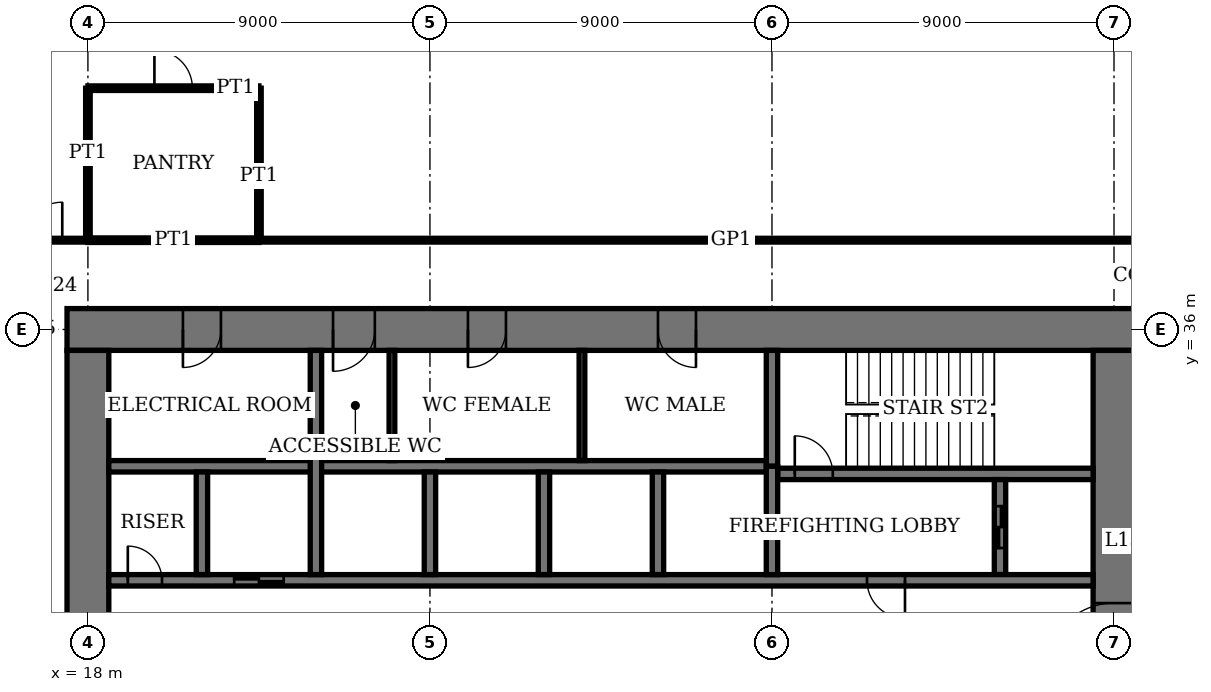
"""IFC4 building model, lengths in metres.
Left out: names, types, materials, properties, quantities, classifications, styles, units other than length and angle.
Written with IfcOpenShell. Run it as: python <this file> out.ifc"""

import sys

from ifc_helpers import new_model, si_unit, direction, frame, frame_2d, origin, place, context, subcontext, project, spatial, rectangle, extrude, element, fill, save


model = new_model("IFC4")
c1 = context("Model", 3, precision=1e-05, world=origin(), true_north=direction((0.0, 1.0)))
c2 = subcontext(c1, "Body", "Model", "MODEL_VIEW")
j1 = project(units=[si_unit("LENGTHUNIT", "METRE"), si_unit("PLANEANGLEUNIT", "RADIAN")], contexts=[c1])
p1 = place(None, origin())
s1 = spatial("IfcSite", under=j1, at=p1, CompositionType="ELEMENT")
p2 = place(p1, origin())
s2 = spatial("IfcBuilding", under=s1, at=p2, CompositionType="ELEMENT")
p3 = place(p2, frame((0.0, 0.0, 55.8)))
s3 = spatial("IfcBuildingStorey", under=s2, at=p3, CompositionType="ELEMENT", Elevation=55.8)
p4 = place(p3, frame((45.55, 36.0, 0.0), z_axis=(0.0, 0.0, 1.0), x_axis=(-1.0, 0.0, 0.0)))
e1 = element("IfcWall", 1, at=p4, inside=s3, PredefinedType="SHEAR", context=c2, shape_type="SweptSolid", body=[
    extrude(rectangle(XDim=28.1, YDim=1.1, at=frame_2d((14.05, 0.0))), origin(), (0.0, 0.0, 1.0), 4.0),
])
p5 = place(p4, frame((11.55, 0.0, 0.0)))
e2 = element("IfcOpeningElement", 2, at=p5, cuts=e1, PredefinedType="OPENING", context=c2, shape_type="SweptSolid", body=[
    extrude(rectangle(XDim=1.0, YDim=2.4, at=frame_2d((0.5, 1.2))), frame((0.0, 0.56, 0.0), z_axis=(0.0, -1.0, 0.0), x_axis=(1.0, 0.0, 0.0)), (0.0, 0.0, 1.0), 1.12),
])
p6 = place(p4, frame((16.55, 0.0, 0.0)))
e3 = element("IfcOpeningElement", 3, at=p6, cuts=e1, PredefinedType="OPENING", context=c2, shape_type="SweptSolid", body=[
    extrude(rectangle(XDim=1.0, YDim=2.4, at=frame_2d((0.5, 1.2))), frame((0.0, 0.56, 0.0), z_axis=(0.0, -1.0, 0.0), x_axis=(1.0, 0.0, 0.0)), (0.0, 0.0, 1.0), 1.12),
])
p7 = place(p4, frame((20.0, 0.0, 0.0)))
e4 = element("IfcOpeningElement", 4, at=p7, cuts=e1, PredefinedType="OPENING", context=c2, shape_type="SweptSolid", body=[
    extrude(rectangle(XDim=1.1, YDim=2.4, at=frame_2d((0.55, 1.2))), frame((0.0, 0.56, 0.0), z_axis=(0.0, -1.0, 0.0), x_axis=(1.0, 0.0, 0.0)), (0.0, 0.0, 1.0), 1.12),
])
p8 = place(p4, frame((24.05, 0.0, 0.0)))
e5 = element("IfcOpeningElement", 5, at=p8, cuts=e1, PredefinedType="OPENING", context=c2, shape_type="SweptSolid", body=[
    extrude(rectangle(XDim=1.0, YDim=2.4, at=frame_2d((0.5, 1.2))), frame((0.0, 0.56, 0.0), z_axis=(0.0, -1.0, 0.0), x_axis=(1.0, 0.0, 0.0)), (0.0, 0.0, 1.0), 1.12),
])
p9 = place(p3, frame((18.0, 35.45, 0.0), z_axis=(0.0, 0.0, 1.0), x_axis=(0.0, -1.0, 0.0)))
e6 = element("IfcWall", 6, at=p9, inside=s3, PredefinedType="SHEAR", context=c2, shape_type="SweptSolid", body=[
    extrude(rectangle(XDim=16.9, YDim=1.1, at=frame_2d((8.45, 0.0))), origin(), (0.0, 0.0, 1.0), 4.0),
])
p10 = place(p9, frame((8.45, 0.0, 0.0)))
e7 = element("IfcOpeningElement", 7, at=p10, cuts=e6, PredefinedType="OPENING", context=c2, shape_type="SweptSolid", body=[
    extrude(rectangle(XDim=1.8, YDim=2.4, at=frame_2d((0.9, 1.2))), frame((0.0, 0.56, 0.0), z_axis=(0.0, -1.0, 0.0), x_axis=(1.0, 0.0, 0.0)), (0.0, 0.0, 1.0), 1.12),
])
p11 = place(p3, frame((45.0, 18.55, 0.0), z_axis=(0.0, 0.0, 1.0), x_axis=(0.0, 1.0, 0.0)))
e8 = element("IfcWall", 8, at=p11, inside=s3, PredefinedType="SHEAR", context=c2, shape_type="SweptSolid", body=[
    extrude(rectangle(XDim=16.9, YDim=1.1, at=frame_2d((8.45, 0.0))), origin(), (0.0, 0.0, 1.0), 4.0),
])
p12 = place(p11, frame((8.45, 0.0, 0.0)))
e9 = element("IfcOpeningElement", 9, at=p12, cuts=e8, PredefinedType="OPENING", context=c2, shape_type="SweptSolid", body=[
    extrude(rectangle(XDim=1.8, YDim=2.4, at=frame_2d((0.9, 1.2))), frame((0.0, 0.56, 0.0), z_axis=(0.0, -1.0, 0.0), x_axis=(1.0, 0.0, 0.0)), (0.0, 0.0, 1.0), 1.12),
])
p13 = place(p3, frame((36.15, 32.2, 0.0), z_axis=(0.0, 0.0, 1.0), x_axis=(1.0, 0.0, 0.0)))
e10 = element("IfcWall", 10, at=p13, inside=s3, PredefinedType="SHEAR", context=c2, shape_type="SweptSolid", body=[
    extrude(rectangle(XDim=8.3, YDim=0.3, at=frame_2d((4.15, 0.0))), origin(), (0.0, 0.0, 1.0), 4.0),
])
p14 = place(p13, frame((0.45, 0.0, 0.0)))
e11 = element("IfcOpeningElement", 11, at=p14, cuts=e10, PredefinedType="OPENING", context=c2, shape_type="SweptSolid", body=[
    extrude(rectangle(XDim=1.0, YDim=2.4, at=frame_2d((0.5, 1.2))), frame((0.0, 0.16, 0.0), z_axis=(0.0, -1.0, 0.0), x_axis=(1.0, 0.0, 0.0)), (0.0, 0.0, 1.0), 0.32),
])
p15 = place(p3, frame((36.0, 32.4, 0.0), z_axis=(0.0, 0.0, 1.0), x_axis=(0.0, 1.0, 0.0)))
e12 = element("IfcWall", 12, at=p15, inside=s3, PredefinedType="SHEAR", context=c2, shape_type="SweptSolid", body=[
    extrude(rectangle(XDim=3.05, YDim=0.3, at=frame_2d((1.525, 0.0))), origin(), (0.0, 0.0, 1.0), 4.0),
])
p16 = place(p3, frame((42.0, 29.55, 0.0), z_axis=(0.0, 0.0, 1.0), x_axis=(0.0, 1.0, 0.0)))
e13 = element("IfcWall", 13, at=p16, inside=s3, PredefinedType="SHEAR", context=c2, shape_type="SweptSolid", body=[
    extrude(rectangle(XDim=2.5, YDim=0.3, at=frame_2d((1.25, 0.0))), origin(), (0.0, 0.0, 1.0), 4.0),
])
p17 = place(p16, frame((0.7, 0.0, 0.0)))
e14 = element("IfcOpeningElement", 14, at=p17, cuts=e13, PredefinedType="OPENING", context=c2, shape_type="SweptSolid", body=[
    extrude(rectangle(XDim=1.1, YDim=2.4, at=frame_2d((0.55, 1.2))), frame((0.0, 0.16, 0.0), z_axis=(0.0, -1.0, 0.0), x_axis=(1.0, 0.0, 0.0)), (0.0, 0.0, 1.0), 0.32),
])
p18 = place(p3, frame((18.55, 29.4, 0.0), z_axis=(0.0, 0.0, 1.0), x_axis=(1.0, 0.0, 0.0)))
e15 = element("IfcWall", 15, at=p18, inside=s3, PredefinedType="SHEAR", context=c2, shape_type="SweptSolid", body=[
    extrude(rectangle(XDim=25.9, YDim=0.3, at=frame_2d((12.95, 0.0))), origin(), (0.0, 0.0, 1.0), 4.0),
])
p19 = place(p18, frame((19.95, 0.0, 0.0)))
e16 = element("IfcOpeningElement", 16, at=p19, cuts=e15, PredefinedType="OPENING", context=c2, shape_type="SweptSolid", body=[
    extrude(rectangle(XDim=1.0, YDim=2.4, at=frame_2d((0.5, 1.2))), frame((0.0, 0.16, 0.0), z_axis=(0.0, -1.0, 0.0), x_axis=(1.0, 0.0, 0.0)), (0.0, 0.0, 1.0), 0.32),
])
p20 = place(p18, frame((0.5, 0.0, 0.0)))
e17 = element("IfcOpeningElement", 17, at=p20, cuts=e15, PredefinedType="OPENING", context=c2, shape_type="SweptSolid", body=[
    extrude(rectangle(XDim=0.9, YDim=2.1, at=frame_2d((0.45, 1.05))), frame((0.0, 0.16, 0.0), z_axis=(0.0, -1.0, 0.0), x_axis=(1.0, 0.0, 0.0)), (0.0, 0.0, 1.0), 0.32),
])
p21 = place(p18, frame((3.3, 0.0, 0.0)))
e18 = element("IfcOpeningElement", 18, at=p21, cuts=e15, PredefinedType="OPENING", context=c2, shape_type="SweptSolid", body=[
    extrude(rectangle(XDim=1.3, YDim=2.4, at=frame_2d((0.65, 1.2))), frame((0.0, 0.16, 0.0), z_axis=(0.0, -1.0, 0.0), x_axis=(1.0, 0.0, 0.0)), (0.0, 0.0, 1.0), 0.32),
])
p22 = place(p3, frame((18.55, 32.4, 0.0), z_axis=(0.0, 0.0, 1.0), x_axis=(1.0, 0.0, 0.0)))
e19 = element("IfcWall", 19, at=p22, inside=s3, PredefinedType="SHEAR", context=c2, shape_type="SweptSolid", body=[
    extrude(rectangle(XDim=17.3, YDim=0.3, at=frame_2d((8.65, 0.0))), origin(), (0.0, 0.0, 1.0), 4.0),
])
for number, where, z_axis, x_axis in (
    (20, (33.0, 29.55, 0.0), (0.0, 0.0, 1.0), (0.0, 1.0, 0.0)),
    (21, (30.0, 29.55, 0.0), (0.0, 0.0, 1.0), (0.0, 1.0, 0.0)),
    (22, (27.0, 29.55, 0.0), (0.0, 0.0, 1.0), (0.0, 1.0, 0.0)),
):
    element("IfcWall", number, at=place(p3, frame(where, z_axis=z_axis, x_axis=x_axis)), inside=s3, PredefinedType="SHEAR", context=c2, shape_type="SweptSolid", body=[
        extrude(rectangle(XDim=2.7, YDim=0.3, at=frame_2d((1.35, 0.0))), origin(), (0.0, 0.0, 1.0), 4.0),
    ])
p23 = place(p3, frame((24.0, 29.55, 0.0), z_axis=(0.0, 0.0, 1.0), x_axis=(0.0, 1.0, 0.0)))
e23 = element("IfcWall", 23, at=p23, inside=s3, PredefinedType="SHEAR", context=c2, shape_type="SweptSolid", body=[
    extrude(rectangle(XDim=5.9, YDim=0.3, at=frame_2d((2.95, 0.0))), origin(), (0.0, 0.0, 1.0), 4.0),
])
p24 = place(p3, frame((21.0, 29.55, 0.0), z_axis=(0.0, 0.0, 1.0), x_axis=(0.0, 1.0, 0.0)))
e24 = element("IfcWall", 24, at=p24, inside=s3, PredefinedType="SHEAR", context=c2, shape_type="SweptSolid", body=[
    extrude(rectangle(XDim=2.7, YDim=0.3, at=frame_2d((1.35, 0.0))), origin(), (0.0, 0.0, 1.0), 4.0),
])
p25 = place(p3, frame((36.0, 29.55, 0.0), z_axis=(0.0, 0.0, 1.0), x_axis=(0.0, 1.0, 0.0)))
e25 = element("IfcWall", 25, at=p25, inside=s3, PredefinedType="SHEAR", context=c2, shape_type="SweptSolid", body=[
    extrude(rectangle(XDim=2.85, YDim=0.3, at=frame_2d((1.425, 0.0))), origin(), (0.0, 0.0, 1.0), 4.0),
])
p26 = place(p3, frame((18.0, 38.35, 0.0), z_axis=(0.0, 0.0, 1.0), x_axis=(1.0, 0.0, 0.0)))
e26 = element("IfcWall", 26, at=p26, inside=s3, PredefinedType="PARTITIONING", context=c2, shape_type="SweptSolid", body=[
    extrude(rectangle(XDim=4.5, YDim=0.12, at=frame_2d((2.25, 0.0))), origin(), (0.0, 0.0, 1.0), 3.75),
])
p27 = place(p3, frame((15.65, 38.35, 0.0), z_axis=(0.0, 0.0, 1.0), x_axis=(1.0, 0.0, 0.0)))
e27 = element("IfcWall", 27, at=p27, inside=s3, PredefinedType="PARTITIONING", context=c2, shape_type="SweptSolid", body=[
    extrude(rectangle(XDim=2.35, YDim=0.1, at=frame_2d((1.175, 0.0))), origin(), (0.0, 0.0, 1.0), 3.75),
])
p28 = place(p27, frame((0.675, 0.0, 0.0)))
e28 = element("IfcOpeningElement", 28, at=p28, cuts=e27, PredefinedType="OPENING", context=c2, shape_type="SweptSolid", body=[
    extrude(rectangle(XDim=1.0, YDim=2.4, at=frame_2d((0.5, 1.2))), frame((0.0, 0.06, 0.0), z_axis=(0.0, -1.0, 0.0), x_axis=(1.0, 0.0, 0.0)), (0.0, 0.0, 1.0), 0.12),
])
p29 = place(p3, frame((22.5, 38.35, 0.0), z_axis=(0.0, 0.0, 1.0), x_axis=(1.0, 0.0, 0.0)))
e29 = element("IfcWall", 29, at=p29, inside=s3, PredefinedType="PARTITIONING", context=c2, shape_type="SweptSolid", body=[
    extrude(rectangle(XDim=24.85, YDim=0.1, at=frame_2d((12.425, 0.0))), origin(), (0.0, 0.0, 1.0), 3.75),
])
p30 = place(p3, frame((18.0, 42.35, 0.0), z_axis=(0.0, 0.0, 1.0), x_axis=(1.0, 0.0, 0.0)))
e30 = element("IfcWall", 30, at=p30, inside=s3, PredefinedType="PARTITIONING", context=c2, shape_type="SweptSolid", body=[
    extrude(rectangle(XDim=4.5, YDim=0.12, at=frame_2d((2.25, 0.0))), origin(), (0.0, 0.0, 1.0), 3.75),
])
p31 = place(p30, frame((1.75, 0.0, 0.0)))
e31 = element("IfcOpeningElement", 31, at=p31, cuts=e30, PredefinedType="OPENING", context=c2, shape_type="SweptSolid", body=[
    extrude(rectangle(XDim=1.0, YDim=2.4, at=frame_2d((0.5, 1.2))), frame((0.0, 0.07, 0.0), z_axis=(0.0, -1.0, 0.0), x_axis=(1.0, 0.0, 0.0)), (0.0, 0.0, 1.0), 0.14),
])
p32 = place(p3, frame((18.0, 38.35, 0.0), z_axis=(0.0, 0.0, 1.0), x_axis=(0.0, 1.0, 0.0)))
e32 = element("IfcWall", 32, at=p32, inside=s3, PredefinedType="PARTITIONING", context=c2, shape_type="SweptSolid", body=[
    extrude(rectangle(XDim=4.0, YDim=0.12, at=frame_2d((2.0, 0.0))), origin(), (0.0, 0.0, 1.0), 3.05),
])
p33 = place(p3, frame((22.5, 38.35, 0.0), z_axis=(0.0, 0.0, 1.0), x_axis=(0.0, 1.0, 0.0)))
e33 = element("IfcWall", 33, at=p33, inside=s3, PredefinedType="PARTITIONING", context=c2, shape_type="SweptSolid", body=[
    extrude(rectangle(XDim=4.0, YDim=0.12, at=frame_2d((2.0, 0.0))), origin(), (0.0, 0.0, 1.0), 3.75),
])
for number, where, z_axis, x_axis in (
    (34, (31.0, 32.55, 0.0), (0.0, 0.0, 1.0), (0.0, 1.0, 0.0)),
    (35, (26.0, 32.55, 0.0), (0.0, 0.0, 1.0), (0.0, 1.0, 0.0)),
):
    element("IfcWall", number, at=place(p3, frame(where, z_axis=z_axis, x_axis=x_axis)), inside=s3, PredefinedType="PARTITIONING", context=c2, shape_type="SweptSolid", body=[
        extrude(rectangle(XDim=2.9, YDim=0.15, at=frame_2d((1.45, 0.0))), origin(), (0.0, 0.0, 1.0), 3.75),
    ])
p34 = place(p12, origin())
e36 = element("IfcDoor", 36, at=p34, inside=s3, OperationType="DOUBLE_DOOR_DOUBLE_SWING", PredefinedType="DOOR", context=c2, shape_type="SweptSolid", body=[
    extrude(rectangle(XDim=1.8, YDim=2.4, at=frame_2d((0.9, 1.2))), frame((0.0, 0.03, 0.0), z_axis=(0.0, -1.0, 0.0), x_axis=(1.0, 0.0, 0.0)), (0.0, 0.0, 1.0), 0.06),
    extrude(rectangle(XDim=0.04, YDim=2.4, at=frame_2d((0.02, 1.2))), frame((0.0, 0.55, 0.0), z_axis=(0.0, -1.0, 0.0), x_axis=(1.0, 0.0, 0.0)), (0.0, 0.0, 1.0), 1.1),
    extrude(rectangle(XDim=0.04, YDim=2.4, at=frame_2d((1.78, 1.2))), frame((0.0, 0.55, 0.0), z_axis=(0.0, -1.0, 0.0), x_axis=(1.0, 0.0, 0.0)), (0.0, 0.0, 1.0), 1.1),
    extrude(rectangle(XDim=1.8, YDim=0.04, at=frame_2d((0.9, 2.38))), frame((0.0, 0.55, 0.0), z_axis=(0.0, -1.0, 0.0), x_axis=(1.0, 0.0, 0.0)), (0.0, 0.0, 1.0), 1.1),
])
fill(e9, e36)
p35 = place(p5, origin())
e37 = element("IfcDoor", 37, at=p35, inside=s3, OperationType="SINGLE_SWING_RIGHT", PredefinedType="DOOR", context=c2, shape_type="SweptSolid", body=[
    extrude(rectangle(XDim=1.0, YDim=2.4, at=frame_2d((0.5, 1.2))), frame((0.0, 0.025, 0.0), z_axis=(0.0, -1.0, 0.0), x_axis=(1.0, 0.0, 0.0)), (0.0, 0.0, 1.0), 0.05),
    extrude(rectangle(XDim=0.04, YDim=2.4, at=frame_2d((0.02, 1.2))), frame((0.0, 0.4, 0.0), z_axis=(0.0, -1.0, 0.0), x_axis=(1.0, 0.0, 0.0)), (0.0, 0.0, 1.0), 0.8),
    extrude(rectangle(XDim=0.04, YDim=2.4, at=frame_2d((0.98, 1.2))), frame((0.0, 0.4, 0.0), z_axis=(0.0, -1.0, 0.0), x_axis=(1.0, 0.0, 0.0)), (0.0, 0.0, 1.0), 0.8),
    extrude(rectangle(XDim=1.0, YDim=0.04, at=frame_2d((0.5, 2.38))), frame((0.0, 0.4, 0.0), z_axis=(0.0, -1.0, 0.0), x_axis=(1.0, 0.0, 0.0)), (0.0, 0.0, 1.0), 0.8),
])
fill(e2, e37)
p36 = place(p6, origin())
e38 = element("IfcDoor", 38, at=p36, inside=s3, OperationType="SINGLE_SWING_LEFT", PredefinedType="DOOR", context=c2, shape_type="SweptSolid", body=[
    extrude(rectangle(XDim=1.0, YDim=2.4, at=frame_2d((0.5, 1.2))), frame((0.0, 0.025, 0.0), z_axis=(0.0, -1.0, 0.0), x_axis=(1.0, 0.0, 0.0)), (0.0, 0.0, 1.0), 0.05),
    extrude(rectangle(XDim=0.04, YDim=2.4, at=frame_2d((0.02, 1.2))), frame((0.0, 0.4, 0.0), z_axis=(0.0, -1.0, 0.0), x_axis=(1.0, 0.0, 0.0)), (0.0, 0.0, 1.0), 0.8),
    extrude(rectangle(XDim=0.04, YDim=2.4, at=frame_2d((0.98, 1.2))), frame((0.0, 0.4, 0.0), z_axis=(0.0, -1.0, 0.0), x_axis=(1.0, 0.0, 0.0)), (0.0, 0.0, 1.0), 0.8),
    extrude(rectangle(XDim=1.0, YDim=0.04, at=frame_2d((0.5, 2.38))), frame((0.0, 0.4, 0.0), z_axis=(0.0, -1.0, 0.0), x_axis=(1.0, 0.0, 0.0)), (0.0, 0.0, 1.0), 0.8),
])
fill(e3, e38)
p37 = place(p7, origin())
e39 = element("IfcDoor", 39, at=p37, inside=s3, OperationType="SINGLE_SWING_LEFT", PredefinedType="DOOR", context=c2, shape_type="SweptSolid", body=[
    extrude(rectangle(XDim=1.1, YDim=2.4, at=frame_2d((0.55, 1.2))), frame((0.0, 0.025, 0.0), z_axis=(0.0, -1.0, 0.0), x_axis=(1.0, 0.0, 0.0)), (0.0, 0.0, 1.0), 0.05),
    extrude(rectangle(XDim=0.04, YDim=2.4, at=frame_2d((0.02, 1.2))), frame((0.0, 0.44, 0.0), z_axis=(0.0, -1.0, 0.0), x_axis=(1.0, 0.0, 0.0)), (0.0, 0.0, 1.0), 0.88),
    extrude(rectangle(XDim=0.04, YDim=2.4, at=frame_2d((1.08, 1.2))), frame((0.0, 0.44, 0.0), z_axis=(0.0, -1.0, 0.0), x_axis=(1.0, 0.0, 0.0)), (0.0, 0.0, 1.0), 0.88),
    extrude(rectangle(XDim=1.1, YDim=0.04, at=frame_2d((0.55, 2.38))), frame((0.0, 0.44, 0.0), z_axis=(0.0, -1.0, 0.0), x_axis=(1.0, 0.0, 0.0)), (0.0, 0.0, 1.0), 0.88),
])
fill(e4, e39)
p38 = place(p8, origin())
e40 = element("IfcDoor", 40, at=p38, inside=s3, OperationType="SINGLE_SWING_LEFT", PredefinedType="DOOR", context=c2, shape_type="SweptSolid", body=[
    extrude(rectangle(XDim=1.0, YDim=2.4, at=frame_2d((0.5, 1.2))), frame((0.0, 0.025, 0.0), z_axis=(0.0, -1.0, 0.0), x_axis=(1.0, 0.0, 0.0)), (0.0, 0.0, 1.0), 0.05),
    extrude(rectangle(XDim=0.04, YDim=2.4, at=frame_2d((0.02, 1.2))), frame((0.0, 0.4, 0.0), z_axis=(0.0, -1.0, 0.0), x_axis=(1.0, 0.0, 0.0)), (0.0, 0.0, 1.0), 0.8),
    extrude(rectangle(XDim=0.04, YDim=2.4, at=frame_2d((0.98, 1.2))), frame((0.0, 0.4, 0.0), z_axis=(0.0, -1.0, 0.0), x_axis=(1.0, 0.0, 0.0)), (0.0, 0.0, 1.0), 0.8),
    extrude(rectangle(XDim=1.0, YDim=0.04, at=frame_2d((0.5, 2.38))), frame((0.0, 0.4, 0.0), z_axis=(0.0, -1.0, 0.0), x_axis=(1.0, 0.0, 0.0)), (0.0, 0.0, 1.0), 0.8),
])
fill(e5, e40)
p39 = place(p14, origin())
e41 = element("IfcDoor", 41, at=p39, inside=s3, OperationType="SINGLE_SWING_RIGHT", PredefinedType="DOOR", context=c2, shape_type="SweptSolid", body=[
    extrude(rectangle(XDim=1.0, YDim=2.4, at=frame_2d((0.5, 1.2))), frame((0.0, 0.03, 0.0), z_axis=(0.0, -1.0, 0.0), x_axis=(1.0, 0.0, 0.0)), (0.0, 0.0, 1.0), 0.06),
])
fill(e11, e41)
p40 = place(p19, origin())
e42 = element("IfcDoor", 42, at=p40, inside=s3, OperationType="SINGLE_SWING_RIGHT", PredefinedType="DOOR", context=c2, shape_type="SweptSolid", body=[
    extrude(rectangle(XDim=1.0, YDim=2.4, at=frame_2d((0.5, 1.2))), frame((0.0, 0.03, 0.0), z_axis=(0.0, -1.0, 0.0), x_axis=(1.0, 0.0, 0.0)), (0.0, 0.0, 1.0), 0.06),
])
fill(e16, e42)
p41 = place(p20, origin())
e43 = element("IfcDoor", 43, at=p41, inside=s3, OperationType="SINGLE_SWING_RIGHT", PredefinedType="DOOR", context=c2, shape_type="SweptSolid", body=[
    extrude(rectangle(XDim=0.9, YDim=2.1, at=frame_2d((0.45, 1.05))), frame((0.0, 0.03, 0.0), z_axis=(0.0, -1.0, 0.0), x_axis=(1.0, 0.0, 0.0)), (0.0, 0.0, 1.0), 0.06),
])
fill(e17, e43)
p42 = place(p28, origin())
e44 = element("IfcDoor", 44, at=p42, inside=s3, OperationType="SINGLE_SWING_LEFT", PredefinedType="DOOR", context=c2, shape_type="SweptSolid", body=[
    extrude(rectangle(XDim=1.0, YDim=2.4, at=frame_2d((0.5, 1.2))), frame((0.0, 0.02, 0.0), z_axis=(0.0, -1.0, 0.0), x_axis=(1.0, 0.0, 0.0)), (0.0, 0.0, 1.0), 0.04),
])
fill(e28, e44)
p43 = place(p31, origin())
e45 = element("IfcDoor", 45, at=p43, inside=s3, OperationType="SINGLE_SWING_RIGHT", PredefinedType="DOOR", context=c2, shape_type="SweptSolid", body=[
    extrude(rectangle(XDim=1.0, YDim=2.4, at=frame_2d((0.5, 1.2))), frame((0.0, 0.025, 0.0), z_axis=(0.0, -1.0, 0.0), x_axis=(1.0, 0.0, 0.0)), (0.0, 0.0, 1.0), 0.05),
])
fill(e31, e45)
p44 = place(p21, origin())
e46 = element("IfcDoor", 46, at=p44, inside=s3, OperationType="DOUBLE_DOOR_SLIDING", PredefinedType="DOOR", context=c2, shape_type="SweptSolid", body=[
    extrude(rectangle(XDim=1.3, YDim=2.4, at=frame_2d((0.65, 1.2))), frame((0.0, 0.02, 0.0), z_axis=(0.0, -1.0, 0.0), x_axis=(1.0, 0.0, 0.0)), (0.0, 0.0, 1.0), 0.04),
])
fill(e18, e46)
p45 = place(p17, origin())
e47 = element("IfcDoor", 47, at=p45, inside=s3, OperationType="DOUBLE_DOOR_SLIDING", PredefinedType="DOOR", context=c2, shape_type="SweptSolid", body=[
    extrude(rectangle(XDim=1.1, YDim=2.4, at=frame_2d((0.55, 1.2))), frame((0.0, 0.03, 0.0), z_axis=(0.0, -1.0, 0.0), x_axis=(1.0, 0.0, 0.0)), (0.0, 0.0, 1.0), 0.06),
])
fill(e14, e47)
save(model, sys.argv[1])
